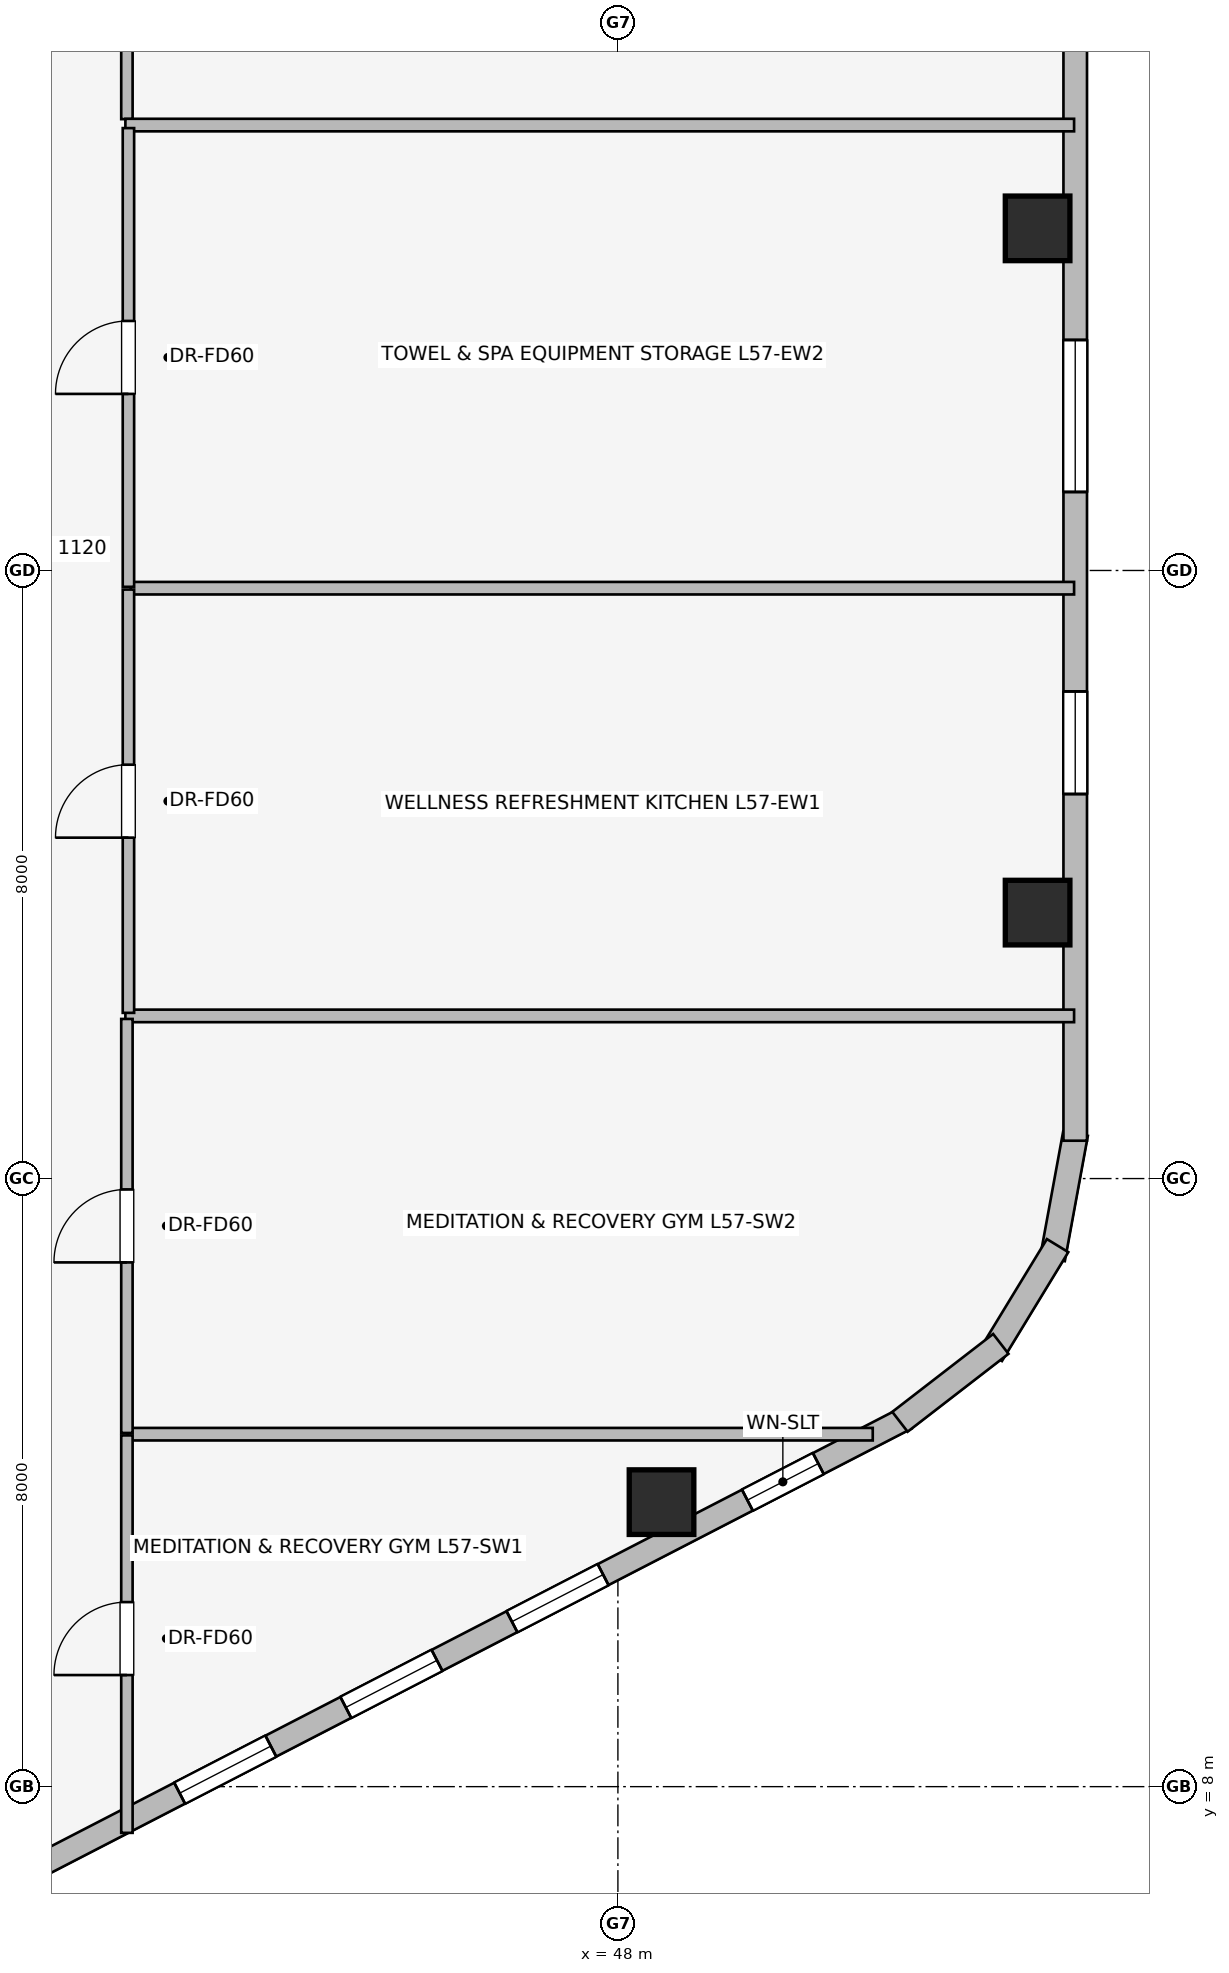
"""IFC4 building model, lengths in metres.
Left out: names, types, materials, properties, quantities, classifications, styles, units other than length and angle.
Written with IfcOpenShell. Run it as: python <this file> out.ifc"""

import sys

from ifc_helpers import new_model, si_unit, direction, frame, frame_2d, origin, origin_2d, place, context, subcontext, project, spatial, rectangle, extrude, element, fill, save


model = new_model("IFC4")
c1 = context("Model", 3, precision=1e-05, world=origin(), true_north=direction((0.0, 1.0)))
c2 = subcontext(c1, "Body", "Model", "MODEL_VIEW")
j1 = project(units=[si_unit("LENGTHUNIT", "METRE"), si_unit("PLANEANGLEUNIT", "RADIAN")], contexts=[c1])
p1 = place(None, origin())
s1 = spatial("IfcSite", under=j1, at=p1, CompositionType="ELEMENT")
p2 = place(p1, origin())
s2 = spatial("IfcBuilding", under=s1, at=p2, CompositionType="ELEMENT")
p3 = place(p2, frame((0.0, 0.0, 210.25)))
s3 = spatial("IfcBuildingStorey", under=s2, at=p3, CompositionType="ELEMENT", Elevation=210.25)
for number, where, z_axis, x_axis in (
    (1, (48.574, 11.743, 0.0), (0.0, 0.0, 1.0), (1.0, 0.0, 0.0)),
    (2, (53.522, 19.499, 0.0), (0.0, 0.0, 1.0), (1.0, 0.0, 0.0)),
    (3, (53.522, 28.501, 0.0), (0.0, 0.0, 1.0), (1.0, 0.0, 0.0)),
):
    element("IfcColumn", number, at=place(p3, frame(where, z_axis=z_axis, x_axis=x_axis)), inside=s3, PredefinedType="COLUMN", context=c2, shape_type="SweptSolid", body=[
        extrude(rectangle(XDim=0.85, YDim=0.85, at=origin_2d()), origin(), (0.0, 0.0, 1.0), 3.45),
    ])
p4 = place(p3, frame((51.792, 12.847, 0.0), z_axis=(0.0, 0.0, 1.0), x_axis=(-0.888626188278, -0.458632202867, 0.0)))
e4 = element("IfcWall", 4, at=p4, inside=s3, PredefinedType="STANDARD", context=c2, shape_type="SweptSolid", body=[
    extrude(rectangle(XDim=16.828, YDim=0.31, at=frame_2d((8.414, 0.0))), origin(), (0.0, 0.0, 1.0), 3.19),
])
p5 = place(p4, frame((1.3, 0.0, 0.75)))
e5 = element("IfcOpeningElement", 5, at=p5, cuts=e4, PredefinedType="OPENING", context=c2, shape_type="SweptSolid", body=[
    extrude(rectangle(XDim=1.05, YDim=1.4, at=frame_2d((0.525, 0.7))), frame((0.0, 0.165, 0.0), z_axis=(0.0, -1.0, 0.0), x_axis=(1.0, 0.0, 0.0)), (0.0, 0.0, 1.0), 0.33),
])
p6 = place(p4, frame((4.486, 0.0, 0.75)))
e6 = element("IfcOpeningElement", 6, at=p6, cuts=e4, PredefinedType="OPENING", context=c2, shape_type="SweptSolid", body=[
    extrude(rectangle(XDim=1.35, YDim=1.45, at=frame_2d((0.675, 0.725))), frame((0.0, 0.165, 0.0), z_axis=(0.0, -1.0, 0.0), x_axis=(1.0, 0.0, 0.0)), (0.0, 0.0, 1.0), 0.33),
])
p7 = place(p4, frame((6.946, 0.0, 0.75)))
e7 = element("IfcOpeningElement", 7, at=p7, cuts=e4, PredefinedType="OPENING", context=c2, shape_type="SweptSolid", body=[
    extrude(rectangle(XDim=1.35, YDim=1.45, at=frame_2d((0.675, 0.725))), frame((0.0, 0.165, 0.0), z_axis=(0.0, -1.0, 0.0), x_axis=(1.0, 0.0, 0.0)), (0.0, 0.0, 1.0), 0.33),
])
p8 = place(p4, frame((9.406, 0.0, 0.75)))
e8 = element("IfcOpeningElement", 8, at=p8, cuts=e4, PredefinedType="OPENING", context=c2, shape_type="SweptSolid", body=[
    extrude(rectangle(XDim=1.35, YDim=1.45, at=frame_2d((0.675, 0.725))), frame((0.0, 0.165, 0.0), z_axis=(0.0, -1.0, 0.0), x_axis=(1.0, 0.0, 0.0)), (0.0, 0.0, 1.0), 0.33),
])
p9 = place(p4, frame((14.153, 0.0, 0.75)))
e9 = element("IfcOpeningElement", 9, at=p9, cuts=e4, PredefinedType="OPENING", context=c2, shape_type="SweptSolid", body=[
    extrude(rectangle(XDim=2.0, YDim=1.5, at=frame_2d((1.0, 0.75))), frame((0.0, 0.165, 0.0), z_axis=(0.0, -1.0, 0.0), x_axis=(1.0, 0.0, 0.0)), (0.0, 0.0, 1.0), 0.33),
])
p10 = place(p3, frame((54.021, 16.592, 0.0), z_axis=(0.0, 0.0, 1.0), x_axis=(-0.180717642671, -0.983535019014, 0.0)))
e10 = element("IfcWall", 10, at=p10, inside=s3, PredefinedType="STANDARD", context=c2, shape_type="SweptSolid", body=[
    extrude(rectangle(XDim=1.677, YDim=0.33, at=frame_2d((0.838, 0.0))), origin(), (0.0, 0.0, 1.0), 3.19),
])
p11 = place(p3, frame((53.785, 15.118, 0.0), z_axis=(0.0, 0.0, 1.0), x_axis=(-0.520219286058, -0.85403272444, 0.0)))
e11 = element("IfcWall", 11, at=p11, inside=s3, PredefinedType="STANDARD", context=c2, shape_type="SweptSolid", body=[
    extrude(rectangle(XDim=1.678, YDim=0.33, at=frame_2d((0.839, 0.0))), origin(), (0.0, 0.0, 1.0), 3.19),
])
p12 = place(p3, frame((53.038, 13.825, 0.0), z_axis=(0.0, 0.0, 1.0), x_axis=(-0.791464279355, -0.611215423976, 0.0)))
e12 = element("IfcWall", 12, at=p12, inside=s3, PredefinedType="STANDARD", context=c2, shape_type="SweptSolid", body=[
    extrude(rectangle(XDim=1.677, YDim=0.33, at=frame_2d((0.838, 0.0))), origin(), (0.0, 0.0, 1.0), 3.19),
])
p13 = place(p3, frame((54.017, 31.502, 0.0), z_axis=(0.0, 0.0, 1.0), x_axis=(0.0, -1.0, 0.0)))
e13 = element("IfcWall", 13, at=p13, inside=s3, PredefinedType="STANDARD", context=c2, shape_type="SweptSolid", body=[
    extrude(rectangle(XDim=15.004, YDim=0.31, at=frame_2d((7.502, 0.0))), origin(), (0.0, 0.0, 1.0), 3.19),
])
p14 = place(p13, frame((4.469, 0.0, 0.75)))
e14 = element("IfcOpeningElement", 14, at=p14, cuts=e13, PredefinedType="OPENING", context=c2, shape_type="SweptSolid", body=[
    extrude(rectangle(XDim=2.0, YDim=1.5, at=frame_2d((1.0, 0.75))), frame((0.0, 0.165, 0.0), z_axis=(0.0, -1.0, 0.0), x_axis=(1.0, 0.0, 0.0)), (0.0, 0.0, 1.0), 0.33),
])
p15 = place(p13, frame((9.093, 0.0, 0.75)))
e15 = element("IfcOpeningElement", 15, at=p15, cuts=e13, PredefinedType="OPENING", context=c2, shape_type="SweptSolid", body=[
    extrude(rectangle(XDim=1.35, YDim=1.45, at=frame_2d((0.675, 0.725))), frame((0.0, 0.165, 0.0), z_axis=(0.0, -1.0, 0.0), x_axis=(1.0, 0.0, 0.0)), (0.0, 0.0, 1.0), 0.33),
])
p16 = place(p3, frame((41.54, 34.938, 0.0), z_axis=(0.0, 0.0, 1.0), x_axis=(0.0, -1.0, 0.0)))
e16 = element("IfcWall", 16, at=p16, inside=s3, PredefinedType="PARTITIONING", context=c2, shape_type="SweptSolid", body=[
    extrude(rectangle(XDim=5.0, YDim=0.15, at=frame_2d((2.5, 0.0))), origin(), (0.0, 0.0, 1.0), 3.19),
])
p17 = place(p16, frame((1.795, 0.0, 0.0)))
e17 = element("IfcOpeningElement", 17, at=p17, cuts=e16, PredefinedType="OPENING", context=c2, shape_type="SweptSolid", body=[
    extrude(rectangle(XDim=0.96, YDim=2.0, at=frame_2d((0.48, 1.0))), frame((0.0, 0.085, 0.0), z_axis=(0.0, -1.0, 0.0), x_axis=(1.0, 0.0, 0.0)), (0.0, 0.0, 1.0), 0.17),
])
for number, where, z_axis, x_axis in (
    (18, (41.52, 18.14, 0.0), (0.0, 0.0, 1.0), (1.0, 0.0, 0.0)),
    (19, (41.52, 29.86, 0.0), (0.0, 0.0, 1.0), (1.0, 0.0, 0.0)),
):
    element("IfcWall", number, at=place(p3, frame(where, z_axis=z_axis, x_axis=x_axis)), inside=s3, PredefinedType="PARTITIONING", context=c2, shape_type="SweptSolid", body=[
        extrude(rectangle(XDim=12.482, YDim=0.165, at=frame_2d((6.241, 0.0))), origin(), (0.0, 0.0, 1.0), 3.19),
    ])
p18 = place(p3, frame((41.59, 23.767, 0.0), z_axis=(0.0, 0.0, 1.0), x_axis=(1.0, 0.0, 0.0)))
e20 = element("IfcWall", 20, at=p18, inside=s3, PredefinedType="PARTITIONING", context=c2, shape_type="SweptSolid", body=[
    extrude(rectangle(XDim=12.412, YDim=0.165, at=frame_2d((6.206, 0.0))), origin(), (0.0, 0.0, 1.0), 2.494),
])
p19 = place(p3, frame((41.56, 18.18, 0.0), z_axis=(0.0, 0.0, 1.0), x_axis=(0.0, 1.0, 0.0)))
e21 = element("IfcWall", 21, at=p19, inside=s3, PredefinedType="PARTITIONING", context=c2, shape_type="SweptSolid", body=[
    extrude(rectangle(XDim=5.569, YDim=0.15, at=frame_2d((2.785, 0.0))), origin(), (0.0, 0.0, 1.0), 3.19),
])
p20 = place(p19, frame((2.305, 0.0, 0.0)))
e22 = element("IfcOpeningElement", 22, at=p20, cuts=e21, PredefinedType="OPENING", context=c2, shape_type="SweptSolid", body=[
    extrude(rectangle(XDim=0.96, YDim=2.0, at=frame_2d((0.48, 1.0))), frame((0.0, 0.085, 0.0), z_axis=(0.0, -1.0, 0.0), x_axis=(1.0, 0.0, 0.0)), (0.0, 0.0, 1.0), 0.17),
])
p21 = place(p3, frame((41.56, 23.785, 0.0), z_axis=(0.0, 0.0, 1.0), x_axis=(0.0, 1.0, 0.0)))
e23 = element("IfcWall", 23, at=p21, inside=s3, PredefinedType="PARTITIONING", context=c2, shape_type="SweptSolid", body=[
    extrude(rectangle(XDim=6.035, YDim=0.15, at=frame_2d((3.018, 0.0))), origin(), (0.0, 0.0, 1.0), 3.19),
])
p22 = place(p21, frame((2.538, 0.0, 0.0)))
e24 = element("IfcOpeningElement", 24, at=p22, cuts=e23, PredefinedType="OPENING", context=c2, shape_type="SweptSolid", body=[
    extrude(rectangle(XDim=0.96, YDim=2.0, at=frame_2d((0.48, 1.0))), frame((0.0, 0.085, 0.0), z_axis=(0.0, -1.0, 0.0), x_axis=(1.0, 0.0, 0.0)), (0.0, 0.0, 1.0), 0.17),
])
p23 = place(p3, frame((41.55, 12.637, 0.0), z_axis=(0.0, 0.0, 1.0), x_axis=(1.0, 0.0, 0.0)))
e25 = element("IfcWall", 25, at=p23, inside=s3, PredefinedType="PARTITIONING", context=c2, shape_type="SweptSolid", body=[
    extrude(rectangle(XDim=9.803, YDim=0.165, at=frame_2d((4.901, 0.0))), origin(), (0.0, 0.0, 1.0), 3.19),
])
p24 = place(p3, frame((41.54, 7.392, 0.0), z_axis=(0.0, 0.0, 1.0), x_axis=(0.0, 1.0, 0.0)))
e26 = element("IfcWall", 26, at=p24, inside=s3, PredefinedType="PARTITIONING", context=c2, shape_type="SweptSolid", body=[
    extrude(rectangle(XDim=5.229, YDim=0.15, at=frame_2d((2.615, 0.0))), origin(), (0.0, 0.0, 1.0), 3.19),
])
p25 = place(p24, frame((2.076, 0.0, 0.0)))
e27 = element("IfcOpeningElement", 27, at=p25, cuts=e26, PredefinedType="OPENING", context=c2, shape_type="SweptSolid", body=[
    extrude(rectangle(XDim=0.96, YDim=2.0, at=frame_2d((0.48, 1.0))), frame((0.0, 0.085, 0.0), z_axis=(0.0, -1.0, 0.0), x_axis=(1.0, 0.0, 0.0)), (0.0, 0.0, 1.0), 0.17),
])
p26 = place(p3, frame((41.54, 12.653, 0.0), z_axis=(0.0, 0.0, 1.0), x_axis=(0.0, 1.0, 0.0)))
e28 = element("IfcWall", 28, at=p26, inside=s3, PredefinedType="PARTITIONING", context=c2, shape_type="SweptSolid", body=[
    extrude(rectangle(XDim=5.447, YDim=0.15, at=frame_2d((2.724, 0.0))), origin(), (0.0, 0.0, 1.0), 3.19),
])
p27 = place(p26, frame((2.244, 0.0, 0.0)))
e29 = element("IfcOpeningElement", 29, at=p27, cuts=e28, PredefinedType="OPENING", context=c2, shape_type="SweptSolid", body=[
    extrude(rectangle(XDim=0.96, YDim=2.0, at=frame_2d((0.48, 1.0))), frame((0.0, 0.085, 0.0), z_axis=(0.0, -1.0, 0.0), x_axis=(1.0, 0.0, 0.0)), (0.0, 0.0, 1.0), 0.17),
])
p28 = place(p5, origin())
e30 = element("IfcWindow", 30, at=p28, inside=s3, PartitioningType="SINGLE_PANEL", PredefinedType="WINDOW", context=c2, shape_type="SweptSolid", body=[
    extrude(rectangle(XDim=1.05, YDim=1.4, at=frame_2d((0.525, 0.7))), frame((0.0, 0.03, 0.0), z_axis=(0.0, -1.0, 0.0), x_axis=(1.0, 0.0, 0.0)), (0.0, 0.0, 1.0), 0.06),
])
fill(e5, e30)
p29 = place(p6, origin())
e31 = element("IfcWindow", 31, at=p29, inside=s3, PartitioningType="SINGLE_PANEL", PredefinedType="WINDOW", context=c2, shape_type="SweptSolid", body=[
    extrude(rectangle(XDim=1.35, YDim=1.45, at=frame_2d((0.675, 0.725))), frame((0.0, 0.03, 0.0), z_axis=(0.0, -1.0, 0.0), x_axis=(1.0, 0.0, 0.0)), (0.0, 0.0, 1.0), 0.06),
])
fill(e6, e31)
p30 = place(p7, origin())
e32 = element("IfcWindow", 32, at=p30, inside=s3, PartitioningType="SINGLE_PANEL", PredefinedType="WINDOW", context=c2, shape_type="SweptSolid", body=[
    extrude(rectangle(XDim=1.35, YDim=1.45, at=frame_2d((0.675, 0.725))), frame((0.0, 0.03, 0.0), z_axis=(0.0, -1.0, 0.0), x_axis=(1.0, 0.0, 0.0)), (0.0, 0.0, 1.0), 0.06),
])
fill(e7, e32)
p31 = place(p8, origin())
e33 = element("IfcWindow", 33, at=p31, inside=s3, PartitioningType="SINGLE_PANEL", PredefinedType="WINDOW", context=c2, shape_type="SweptSolid", body=[
    extrude(rectangle(XDim=1.35, YDim=1.45, at=frame_2d((0.675, 0.725))), frame((0.0, 0.03, 0.0), z_axis=(0.0, -1.0, 0.0), x_axis=(1.0, 0.0, 0.0)), (0.0, 0.0, 1.0), 0.06),
])
fill(e8, e33)
p32 = place(p14, origin())
e34 = element("IfcWindow", 34, at=p32, inside=s3, PartitioningType="SINGLE_PANEL", PredefinedType="WINDOW", context=c2, shape_type="SweptSolid", body=[
    extrude(rectangle(XDim=2.0, YDim=1.5, at=frame_2d((1.0, 0.75))), frame((0.0, 0.03, 0.0), z_axis=(0.0, -1.0, 0.0), x_axis=(1.0, 0.0, 0.0)), (0.0, 0.0, 1.0), 0.06),
])
fill(e14, e34)
p33 = place(p15, origin())
e35 = element("IfcWindow", 35, at=p33, inside=s3, PartitioningType="SINGLE_PANEL", PredefinedType="WINDOW", context=c2, shape_type="SweptSolid", body=[
    extrude(rectangle(XDim=1.35, YDim=1.45, at=frame_2d((0.675, 0.725))), frame((0.0, 0.03, 0.0), z_axis=(0.0, -1.0, 0.0), x_axis=(1.0, 0.0, 0.0)), (0.0, 0.0, 1.0), 0.06),
])
fill(e15, e35)
p34 = place(p20, origin())
e36 = element("IfcDoor", 36, at=p34, inside=s3, OperationType="SINGLE_SWING_LEFT", PredefinedType="DOOR", context=c2, shape_type="SweptSolid", body=[
    extrude(rectangle(XDim=0.96, YDim=2.0, at=frame_2d((0.48, 1.0))), frame((0.0, 0.025, 0.0), z_axis=(0.0, -1.0, 0.0), x_axis=(1.0, 0.0, 0.0)), (0.0, 0.0, 1.0), 0.05),
])
fill(e22, e36)
p35 = place(p22, origin())
e37 = element("IfcDoor", 37, at=p35, inside=s3, OperationType="SINGLE_SWING_LEFT", PredefinedType="DOOR", context=c2, shape_type="SweptSolid", body=[
    extrude(rectangle(XDim=0.96, YDim=2.0, at=frame_2d((0.48, 1.0))), frame((0.0, 0.025, 0.0), z_axis=(0.0, -1.0, 0.0), x_axis=(1.0, 0.0, 0.0)), (0.0, 0.0, 1.0), 0.05),
])
fill(e24, e37)
p36 = place(p25, origin())
e38 = element("IfcDoor", 38, at=p36, inside=s3, OperationType="SINGLE_SWING_LEFT", PredefinedType="DOOR", context=c2, shape_type="SweptSolid", body=[
    extrude(rectangle(XDim=0.96, YDim=2.0, at=frame_2d((0.48, 1.0))), frame((0.0, 0.025, 0.0), z_axis=(0.0, -1.0, 0.0), x_axis=(1.0, 0.0, 0.0)), (0.0, 0.0, 1.0), 0.05),
])
fill(e27, e38)
p37 = place(p27, origin())
e39 = element("IfcDoor", 39, at=p37, inside=s3, OperationType="SINGLE_SWING_LEFT", PredefinedType="DOOR", context=c2, shape_type="SweptSolid", body=[
    extrude(rectangle(XDim=0.96, YDim=2.0, at=frame_2d((0.48, 1.0))), frame((0.0, 0.025, 0.0), z_axis=(0.0, -1.0, 0.0), x_axis=(1.0, 0.0, 0.0)), (0.0, 0.0, 1.0), 0.05),
])
fill(e29, e39)
save(model, sys.argv[1])
